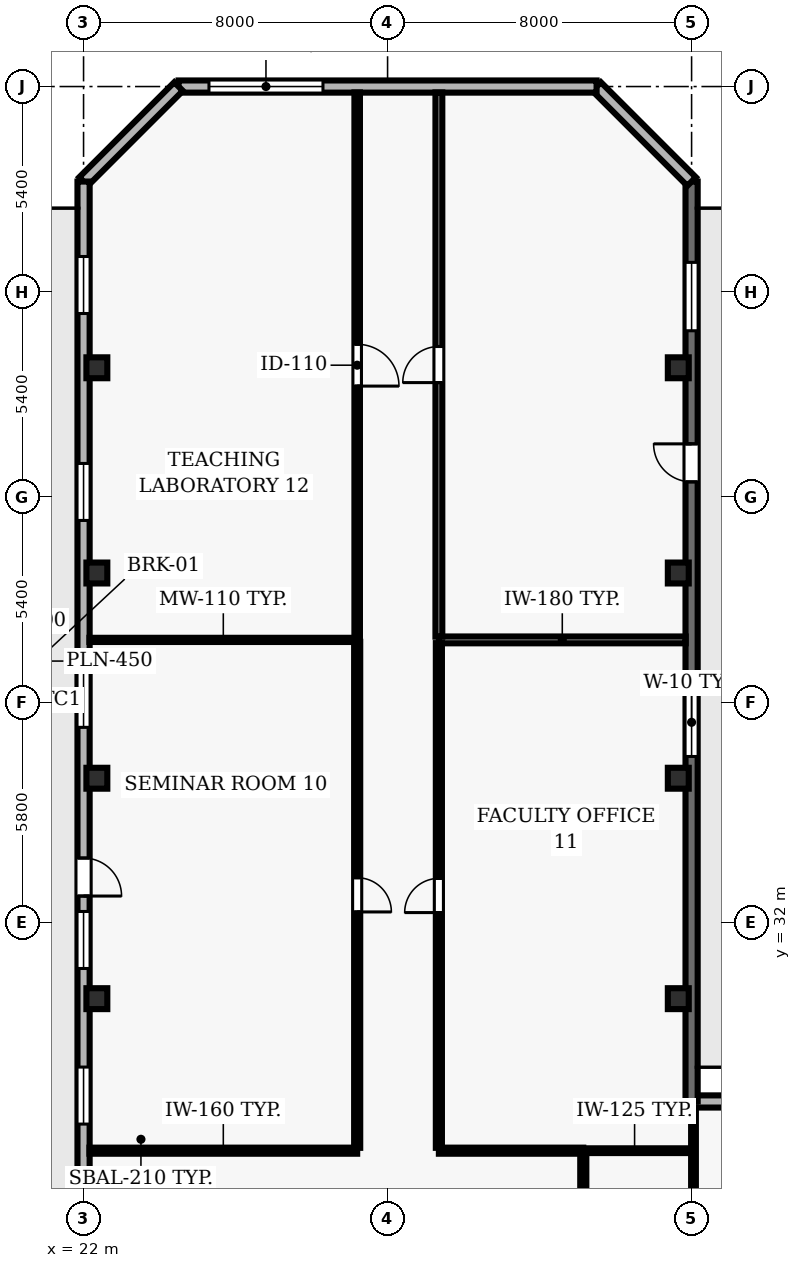
"""IFC4 building model, lengths in metres.
Left out: names, types, materials, properties, quantities, classifications, styles, units other than length and angle.
Written with IfcOpenShell. Run it as: python <this file> out.ifc"""

import sys

from ifc_helpers import new_model, si_unit, direction, frame, frame_2d, origin, origin_2d, place, context, subcontext, project, spatial, rectangle, hollow_rectangle, extrude, element, fill, save


model = new_model("IFC4")
c1 = context("Model", 3, precision=1e-05, world=origin(), true_north=direction((0.0, 1.0)))
c2 = subcontext(c1, "Body", "Model", "MODEL_VIEW")
j1 = project(units=[si_unit("LENGTHUNIT", "METRE"), si_unit("PLANEANGLEUNIT", "RADIAN")], contexts=[c1])
p1 = place(None, origin())
s1 = spatial("IfcSite", under=j1, at=p1, CompositionType="ELEMENT")
p2 = place(p1, origin())
s2 = spatial("IfcBuilding", under=s1, at=p2, CompositionType="ELEMENT")
p3 = place(p2, frame((0.0, 0.0, 58.3)))
s3 = spatial("IfcBuildingStorey", under=s2, at=p3, CompositionType="ELEMENT", Elevation=58.3)
for number, where, z_axis, x_axis in (
    (1, (22.35, 30.0, 0.0), (0.0, 0.0, 1.0), (1.0, 0.0, 0.0)),
    (2, (37.65, 30.0, 0.0), (0.0, 0.0, 1.0), (1.0, 0.0, 0.0)),
    (3, (22.35, 35.8, 0.0), (0.0, 0.0, 1.0), (1.0, 0.0, 0.0)),
    (4, (37.65, 35.8, 0.0), (0.0, 0.0, 1.0), (1.0, 0.0, 0.0)),
    (5, (22.35, 41.2, 0.0), (0.0, 0.0, 1.0), (1.0, 0.0, 0.0)),
    (6, (37.65, 41.2, 0.0), (0.0, 0.0, 1.0), (1.0, 0.0, 0.0)),
    (7, (22.35, 46.6, 0.0), (0.0, 0.0, 1.0), (1.0, 0.0, 0.0)),
    (8, (37.65, 46.6, 0.0), (0.0, 0.0, 1.0), (1.0, 0.0, 0.0)),
):
    element("IfcColumn", number, at=place(p3, frame(where, z_axis=z_axis, x_axis=x_axis)), inside=s3, PredefinedType="COLUMN", context=c2, shape_type="SweptSolid", body=[
        extrude(hollow_rectangle(XDim=0.55, YDim=0.55, WallThickness=0.025, at=origin_2d()), origin(), (0.0, 0.0, 1.0), 3.9),
    ])
p4 = place(p3, frame((51.4, 27.295, 0.0), z_axis=(0.0, 0.0, 1.0), x_axis=(-1.0, 0.0, 0.0)))
e9 = element("IfcWall", 9, at=p4, inside=s3, PredefinedType="SOLIDWALL", context=c2, shape_type="SweptSolid", body=[
    extrude(rectangle(XDim=13.4, YDim=0.32, at=frame_2d((6.7, 0.0))), origin(), (0.0, 0.0, 1.0), 3.69),
])
p5 = place(p4, frame((1.95, 0.0, 0.9)))
e10 = element("IfcOpeningElement", 10, at=p5, cuts=e9, PredefinedType="OPENING", context=c2, shape_type="SweptSolid", body=[
    extrude(rectangle(XDim=2.8, YDim=1.8, at=frame_2d((1.4, 0.9))), frame((0.0, 0.17, 0.0), z_axis=(0.0, -1.0, 0.0), x_axis=(1.0, 0.0, 0.0)), (0.0, 0.0, 1.0), 0.34),
])
p6 = place(p4, frame((8.65, 0.0, 0.9)))
e11 = element("IfcOpeningElement", 11, at=p6, cuts=e9, PredefinedType="OPENING", context=c2, shape_type="SweptSolid", body=[
    extrude(rectangle(XDim=2.8, YDim=1.8, at=frame_2d((1.4, 0.9))), frame((0.0, 0.17, 0.0), z_axis=(0.0, -1.0, 0.0), x_axis=(1.0, 0.0, 0.0)), (0.0, 0.0, 1.0), 0.34),
])
p7 = place(p3, frame((38.0, 27.295, 0.0), z_axis=(0.0, 0.0, 1.0), x_axis=(0.0, 1.0, 0.0)))
e12 = element("IfcWall", 12, at=p7, inside=s3, PredefinedType="SOLIDWALL", context=c2, shape_type="SweptSolid", body=[
    extrude(rectangle(XDim=24.205, YDim=0.32, at=frame_2d((12.103, 0.0))), origin(), (0.0, 0.0, 1.0), 3.69),
])
p8 = place(p7, frame((16.303, 0.0, 0.0)))
e13 = element("IfcOpeningElement", 13, at=p8, cuts=e12, PredefinedType="OPENING", context=c2, shape_type="SweptSolid", body=[
    extrude(rectangle(XDim=1.0, YDim=2.2, at=frame_2d((0.5, 1.1))), frame((0.0, 0.17, 0.0), z_axis=(0.0, -1.0, 0.0), x_axis=(1.0, 0.0, 0.0)), (0.0, 0.0, 1.0), 0.34),
])
p9 = place(p7, frame((9.077, 0.0, 0.9)))
e14 = element("IfcOpeningElement", 14, at=p9, cuts=e12, PredefinedType="OPENING", context=c2, shape_type="SweptSolid", body=[
    extrude(rectangle(XDim=1.8, YDim=2.2, at=frame_2d((0.9, 1.1))), frame((0.0, 0.17, 0.0), z_axis=(0.0, -1.0, 0.0), x_axis=(1.0, 0.0, 0.0)), (0.0, 0.0, 1.0), 0.34),
])
p10 = place(p7, frame((20.279, 0.0, 0.9)))
e15 = element("IfcOpeningElement", 15, at=p10, cuts=e12, PredefinedType="OPENING", context=c2, shape_type="SweptSolid", body=[
    extrude(rectangle(XDim=1.8, YDim=2.2, at=frame_2d((0.9, 1.1))), frame((0.0, 0.17, 0.0), z_axis=(0.0, -1.0, 0.0), x_axis=(1.0, 0.0, 0.0)), (0.0, 0.0, 1.0), 0.34),
])
p11 = place(p3, frame((38.0, 51.5, 0.0), z_axis=(0.0, 0.0, 1.0), x_axis=(-0.707106781187, 0.707106781187, 0.0)))
e16 = element("IfcWall", 16, at=p11, inside=s3, PredefinedType="SOLIDWALL", context=c2, shape_type="SweptSolid", body=[
    extrude(rectangle(XDim=3.536, YDim=0.32, at=frame_2d((1.768, 0.0))), origin(), (0.0, 0.0, 1.0), 3.69),
])
p12 = place(p3, frame((35.5, 54.0, 0.0), z_axis=(0.0, 0.0, 1.0), x_axis=(-1.0, 0.0, 0.0)))
e17 = element("IfcWall", 17, at=p12, inside=s3, PredefinedType="SOLIDWALL", context=c2, shape_type="SweptSolid", body=[
    extrude(rectangle(XDim=11.0, YDim=0.32, at=frame_2d((5.5, 0.0))), origin(), (0.0, 0.0, 1.0), 3.69),
])
p13 = place(p12, frame((7.2, 0.0, 0.9)))
e18 = element("IfcOpeningElement", 18, at=p13, cuts=e17, PredefinedType="OPENING", context=c2, shape_type="SweptSolid", body=[
    extrude(rectangle(XDim=3.0, YDim=2.2, at=frame_2d((1.5, 1.1))), frame((0.0, 0.17, 0.0), z_axis=(0.0, -1.0, 0.0), x_axis=(1.0, 0.0, 0.0)), (0.0, 0.0, 1.0), 0.34),
])
p14 = place(p3, frame((24.5, 54.0, 0.0), z_axis=(0.0, 0.0, 1.0), x_axis=(-0.707106781187, -0.707106781187, 0.0)))
e19 = element("IfcWall", 19, at=p14, inside=s3, PredefinedType="SOLIDWALL", context=c2, shape_type="SweptSolid", body=[
    extrude(rectangle(XDim=3.536, YDim=0.32, at=frame_2d((1.768, 0.0))), origin(), (0.0, 0.0, 1.0), 3.69),
])
p15 = place(p3, frame((22.0, 51.5, 0.0), z_axis=(0.0, 0.0, 1.0), x_axis=(0.0, -1.0, 0.0)))
e20 = element("IfcWall", 20, at=p15, inside=s3, PredefinedType="SOLIDWALL", context=c2, shape_type="SweptSolid", body=[
    extrude(rectangle(XDim=49.0, YDim=0.32, at=frame_2d((24.5, 0.0))), origin(), (0.0, 0.0, 1.0), 3.69),
])
p16 = place(p15, frame((17.8, 0.0, 0.0)))
e21 = element("IfcOpeningElement", 21, at=p16, cuts=e20, PredefinedType="OPENING", context=c2, shape_type="SweptSolid", body=[
    extrude(rectangle(XDim=1.0, YDim=2.2, at=frame_2d((0.5, 1.1))), frame((0.0, 0.17, 0.0), z_axis=(0.0, -1.0, 0.0), x_axis=(1.0, 0.0, 0.0)), (0.0, 0.0, 1.0), 0.34),
])
p17 = place(p15, frame((1.972, 0.0, 0.9)))
e22 = element("IfcOpeningElement", 22, at=p17, cuts=e20, PredefinedType="OPENING", context=c2, shape_type="SweptSolid", body=[
    extrude(rectangle(XDim=1.5, YDim=1.6, at=frame_2d((0.75, 0.8))), frame((0.0, 0.17, 0.0), z_axis=(0.0, -1.0, 0.0), x_axis=(1.0, 0.0, 0.0)), (0.0, 0.0, 1.0), 0.34),
])
p18 = place(p15, frame((7.417, 0.0, 0.9)))
e23 = element("IfcOpeningElement", 23, at=p18, cuts=e20, PredefinedType="OPENING", context=c2, shape_type="SweptSolid", body=[
    extrude(rectangle(XDim=1.5, YDim=1.6, at=frame_2d((0.75, 0.8))), frame((0.0, 0.17, 0.0), z_axis=(0.0, -1.0, 0.0), x_axis=(1.0, 0.0, 0.0)), (0.0, 0.0, 1.0), 0.34),
])
p19 = place(p15, frame((12.861, 0.0, 0.9)))
e24 = element("IfcOpeningElement", 24, at=p19, cuts=e20, PredefinedType="OPENING", context=c2, shape_type="SweptSolid", body=[
    extrude(rectangle(XDim=1.5, YDim=1.6, at=frame_2d((0.75, 0.8))), frame((0.0, 0.17, 0.0), z_axis=(0.0, -1.0, 0.0), x_axis=(1.0, 0.0, 0.0)), (0.0, 0.0, 1.0), 0.34),
])
p20 = place(p15, frame((19.206, 0.0, 0.9)))
e25 = element("IfcOpeningElement", 25, at=p20, cuts=e20, PredefinedType="OPENING", context=c2, shape_type="SweptSolid", body=[
    extrude(rectangle(XDim=1.5, YDim=1.6, at=frame_2d((0.75, 0.8))), frame((0.0, 0.17, 0.0), z_axis=(0.0, -1.0, 0.0), x_axis=(1.0, 0.0, 0.0)), (0.0, 0.0, 1.0), 0.34),
])
p21 = place(p15, frame((23.3, 0.0, 0.9)))
e26 = element("IfcOpeningElement", 26, at=p21, cuts=e20, PredefinedType="OPENING", context=c2, shape_type="SweptSolid", body=[
    extrude(rectangle(XDim=1.5, YDim=1.6, at=frame_2d((0.75, 0.8))), frame((0.0, 0.17, 0.0), z_axis=(0.0, -1.0, 0.0), x_axis=(1.0, 0.0, 0.0)), (0.0, 0.0, 1.0), 0.34),
])
p22 = place(p15, frame((29.194, 0.0, 0.9)))
e27 = element("IfcOpeningElement", 27, at=p22, cuts=e20, PredefinedType="OPENING", context=c2, shape_type="SweptSolid", body=[
    extrude(rectangle(XDim=1.5, YDim=1.6, at=frame_2d((0.75, 0.8))), frame((0.0, 0.17, 0.0), z_axis=(0.0, -1.0, 0.0), x_axis=(1.0, 0.0, 0.0)), (0.0, 0.0, 1.0), 0.34),
])
p23 = place(p15, frame((34.189, 0.0, 0.9)))
e28 = element("IfcOpeningElement", 28, at=p23, cuts=e20, PredefinedType="OPENING", context=c2, shape_type="SweptSolid", body=[
    extrude(rectangle(XDim=1.5, YDim=1.6, at=frame_2d((0.75, 0.8))), frame((0.0, 0.17, 0.0), z_axis=(0.0, -1.0, 0.0), x_axis=(1.0, 0.0, 0.0)), (0.0, 0.0, 1.0), 0.34),
])
p24 = place(p15, frame((40.083, 0.0, 0.9)))
e29 = element("IfcOpeningElement", 29, at=p24, cuts=e20, PredefinedType="OPENING", context=c2, shape_type="SweptSolid", body=[
    extrude(rectangle(XDim=1.5, YDim=1.6, at=frame_2d((0.75, 0.8))), frame((0.0, 0.17, 0.0), z_axis=(0.0, -1.0, 0.0), x_axis=(1.0, 0.0, 0.0)), (0.0, 0.0, 1.0), 0.34),
])
p25 = place(p3, frame((29.2, 26.0, 0.0), z_axis=(0.0, 0.0, 1.0), x_axis=(-1.0, 0.0, 0.0)))
e30 = element("IfcWall", 30, at=p25, inside=s3, PredefinedType="PARTITIONING", context=c2, shape_type="SweptSolid", body=[
    extrude(rectangle(XDim=7.045, YDim=0.16, at=frame_2d((3.522, 0.0))), origin(), (0.0, 0.0, 1.0), 3.69),
])
p26 = place(p3, frame((29.2, 39.44, 0.0), z_axis=(0.0, 0.0, 1.0), x_axis=(-1.0, 0.0, 0.0)))
e31 = element("IfcWall", 31, at=p26, inside=s3, PredefinedType="MOVABLE", context=c2, shape_type="SweptSolid", body=[
    extrude(rectangle(XDim=7.045, YDim=0.11, at=frame_2d((3.522, 0.0))), origin(), (0.0, 0.0, 1.0), 3.69),
])
p27 = place(p3, frame((35.15, 26.0, 0.0), z_axis=(0.0, 0.0, 1.0), x_axis=(-1.0, 0.0, 0.0)))
e32 = element("IfcWall", 32, at=p27, inside=s3, PredefinedType="PARTITIONING", context=c2, shape_type="SweptSolid", body=[
    extrude(rectangle(XDim=3.8, YDim=0.16, at=frame_2d((1.9, 0.0))), origin(), (0.0, 0.0, 1.0), 3.69),
])
p28 = place(p3, frame((35.15, 26.0, 0.0), z_axis=(0.0, 0.0, 1.0), x_axis=(1.0, 0.0, 0.0)))
e33 = element("IfcWall", 33, at=p28, inside=s3, PredefinedType="PARTITIONING", context=c2, shape_type="SweptSolid", body=[
    extrude(rectangle(XDim=2.7, YDim=0.125, at=frame_2d((1.35, 0.0))), origin(), (0.0, 0.0, 1.0), 3.69),
])
p29 = place(p3, frame((37.845, 39.44, 0.0), z_axis=(0.0, 0.0, 1.0), x_axis=(-1.0, 0.0, 0.0)))
e34 = element("IfcWall", 34, at=p29, inside=s3, PredefinedType="PARTITIONING", context=c2, shape_type="SweptSolid", body=[
    extrude(rectangle(XDim=6.495, YDim=0.18, at=frame_2d((3.248, 0.0))), origin(), (0.0, 0.0, 1.0), 3.69),
])
p30 = place(p3, frame((29.2, 39.39, 0.0), z_axis=(0.0, 0.0, 1.0), x_axis=(0.0, -1.0, 0.0)))
e35 = element("IfcWall", 35, at=p30, inside=s3, PredefinedType="PARTITIONING", context=c2, shape_type="SweptSolid", body=[
    extrude(rectangle(XDim=13.315, YDim=0.16, at=frame_2d((6.657, 0.0))), origin(), (0.0, 0.0, 1.0), 3.69),
])
p31 = place(p30, frame((6.208, 0.0, 0.0)))
e36 = element("IfcOpeningElement", 36, at=p31, cuts=e35, PredefinedType="OPENING", context=c2, shape_type="SweptSolid", body=[
    extrude(rectangle(XDim=0.9, YDim=2.1, at=frame_2d((0.45, 1.05))), frame((0.0, 0.09, 0.0), z_axis=(0.0, -1.0, 0.0), x_axis=(1.0, 0.0, 0.0)), (0.0, 0.0, 1.0), 0.18),
])
p32 = place(p3, frame((29.2, 53.845, 0.0), z_axis=(0.0, 0.0, 1.0), x_axis=(0.0, -1.0, 0.0)))
e37 = element("IfcWall", 37, at=p32, inside=s3, PredefinedType="PARTITIONING", context=c2, shape_type="SweptSolid", body=[
    extrude(rectangle(XDim=14.355, YDim=0.145, at=frame_2d((7.177, 0.0))), origin(), (0.0, 0.0, 1.0), 3.69),
])
p33 = place(p32, frame((6.627, 0.0, 0.0)))
e38 = element("IfcOpeningElement", 38, at=p33, cuts=e37, PredefinedType="OPENING", context=c2, shape_type="SweptSolid", body=[
    extrude(rectangle(XDim=1.1, YDim=2.15, at=frame_2d((0.55, 1.075))), frame((0.0, 0.083, 0.0), z_axis=(0.0, -1.0, 0.0), x_axis=(1.0, 0.0, 0.0)), (0.0, 0.0, 1.0), 0.165),
])
p34 = place(p3, frame((31.35, 26.075, 0.0), z_axis=(0.0, 0.0, 1.0), x_axis=(0.0, 1.0, 0.0)))
e39 = element("IfcWall", 39, at=p34, inside=s3, PredefinedType="PARTITIONING", context=c2, shape_type="SweptSolid", body=[
    extrude(rectangle(XDim=13.28, YDim=0.16, at=frame_2d((6.64, 0.0))), origin(), (0.0, 0.0, 1.0), 3.69),
])
p35 = place(p34, frame((6.19, 0.0, 0.0)))
e40 = element("IfcOpeningElement", 40, at=p35, cuts=e39, PredefinedType="OPENING", context=c2, shape_type="SweptSolid", body=[
    extrude(rectangle(XDim=0.9, YDim=2.1, at=frame_2d((0.45, 1.05))), frame((0.0, 0.09, 0.0), z_axis=(0.0, -1.0, 0.0), x_axis=(1.0, 0.0, 0.0)), (0.0, 0.0, 1.0), 0.18),
])
p36 = place(p3, frame((31.35, 39.525, 0.0), z_axis=(0.0, 0.0, 1.0), x_axis=(0.0, 1.0, 0.0)))
e41 = element("IfcWall", 41, at=p36, inside=s3, PredefinedType="PARTITIONING", context=c2, shape_type="SweptSolid", body=[
    extrude(rectangle(XDim=14.32, YDim=0.18, at=frame_2d((7.16, 0.0))), origin(), (0.0, 0.0, 1.0), 3.69),
])
p37 = place(p36, frame((6.685, 0.0, 0.0)))
e42 = element("IfcOpeningElement", 42, at=p37, cuts=e41, PredefinedType="OPENING", context=c2, shape_type="SweptSolid", body=[
    extrude(rectangle(XDim=0.95, YDim=2.1, at=frame_2d((0.475, 1.05))), frame((0.0, 0.1, 0.0), z_axis=(0.0, -1.0, 0.0), x_axis=(1.0, 0.0, 0.0)), (0.0, 0.0, 1.0), 0.2),
])
p38 = place(p3, frame((35.15, 24.07, 0.0), z_axis=(0.0, 0.0, 1.0), x_axis=(0.0, 1.0, 0.0)))
e43 = element("IfcWall", 43, at=p38, inside=s3, PredefinedType="PARTITIONING", context=c2, shape_type="SweptSolid", body=[
    extrude(rectangle(XDim=1.855, YDim=0.16, at=frame_2d((0.927, 0.0))), origin(), (0.0, 0.0, 1.0), 3.69),
])
p39 = place(p3, frame((38.05, 27.14, 0.0), z_axis=(0.0, 0.0, 1.0), x_axis=(0.0, -1.0, 0.0)))
e44 = element("IfcWall", 44, at=p39, inside=s3, PredefinedType="PARTITIONING", context=c2, shape_type="SweptSolid", body=[
    extrude(rectangle(XDim=3.09, YDim=0.125, at=frame_2d((1.545, 0.0))), origin(), (0.0, 0.0, 1.0), 3.055),
])
p40 = place(p8, origin())
e45 = element("IfcDoor", 45, at=p40, inside=s3, OperationType="SINGLE_SWING_RIGHT", PredefinedType="DOOR", context=c2, shape_type="SweptSolid", body=[
    extrude(rectangle(XDim=1.0, YDim=2.2, at=frame_2d((0.5, 1.1))), frame((0.0, 0.025, 0.0), z_axis=(0.0, -1.0, 0.0), x_axis=(1.0, 0.0, 0.0)), (0.0, 0.0, 1.0), 0.05),
])
fill(e13, e45)
p41 = place(p9, origin())
e46 = element("IfcWindow", 46, at=p41, inside=s3, PartitioningType="SINGLE_PANEL", PredefinedType="WINDOW", context=c2, shape_type="SweptSolid", body=[
    extrude(rectangle(XDim=1.8, YDim=2.2, at=frame_2d((0.9, 1.1))), frame((0.0, 0.03, 0.0), z_axis=(0.0, -1.0, 0.0), x_axis=(1.0, 0.0, 0.0)), (0.0, 0.0, 1.0), 0.06),
])
fill(e14, e46)
p42 = place(p10, origin())
e47 = element("IfcWindow", 47, at=p42, inside=s3, PartitioningType="SINGLE_PANEL", PredefinedType="WINDOW", context=c2, shape_type="SweptSolid", body=[
    extrude(rectangle(XDim=1.8, YDim=2.2, at=frame_2d((0.9, 1.1))), frame((0.0, 0.03, 0.0), z_axis=(0.0, -1.0, 0.0), x_axis=(1.0, 0.0, 0.0)), (0.0, 0.0, 1.0), 0.06),
])
fill(e15, e47)
p43 = place(p13, origin())
e48 = element("IfcWindow", 48, at=p43, inside=s3, PartitioningType="SINGLE_PANEL", PredefinedType="WINDOW", context=c2, shape_type="SweptSolid", body=[
    extrude(rectangle(XDim=3.0, YDim=2.2, at=frame_2d((1.5, 1.1))), frame((0.0, 0.03, 0.0), z_axis=(0.0, -1.0, 0.0), x_axis=(1.0, 0.0, 0.0)), (0.0, 0.0, 1.0), 0.06),
])
fill(e18, e48)
p44 = place(p16, origin())
e49 = element("IfcDoor", 49, at=p44, inside=s3, OperationType="SINGLE_SWING_RIGHT", PredefinedType="DOOR", context=c2, shape_type="SweptSolid", body=[
    extrude(rectangle(XDim=1.0, YDim=2.2, at=frame_2d((0.5, 1.1))), frame((0.0, 0.025, 0.0), z_axis=(0.0, -1.0, 0.0), x_axis=(1.0, 0.0, 0.0)), (0.0, 0.0, 1.0), 0.05),
])
fill(e21, e49)
p45 = place(p17, origin())
e50 = element("IfcWindow", 50, at=p45, inside=s3, PartitioningType="SINGLE_PANEL", PredefinedType="WINDOW", context=c2, shape_type="SweptSolid", body=[
    extrude(rectangle(XDim=1.5, YDim=1.6, at=frame_2d((0.75, 0.8))), frame((0.0, 0.03, 0.0), z_axis=(0.0, -1.0, 0.0), x_axis=(1.0, 0.0, 0.0)), (0.0, 0.0, 1.0), 0.06),
])
fill(e22, e50)
p46 = place(p18, origin())
e51 = element("IfcWindow", 51, at=p46, inside=s3, PartitioningType="SINGLE_PANEL", PredefinedType="WINDOW", context=c2, shape_type="SweptSolid", body=[
    extrude(rectangle(XDim=1.5, YDim=1.6, at=frame_2d((0.75, 0.8))), frame((0.0, 0.03, 0.0), z_axis=(0.0, -1.0, 0.0), x_axis=(1.0, 0.0, 0.0)), (0.0, 0.0, 1.0), 0.06),
])
fill(e23, e51)
p47 = place(p19, origin())
e52 = element("IfcWindow", 52, at=p47, inside=s3, PartitioningType="SINGLE_PANEL", PredefinedType="WINDOW", context=c2, shape_type="SweptSolid", body=[
    extrude(rectangle(XDim=1.5, YDim=1.6, at=frame_2d((0.75, 0.8))), frame((0.0, 0.03, 0.0), z_axis=(0.0, -1.0, 0.0), x_axis=(1.0, 0.0, 0.0)), (0.0, 0.0, 1.0), 0.06),
])
fill(e24, e52)
p48 = place(p20, origin())
e53 = element("IfcWindow", 53, at=p48, inside=s3, PartitioningType="SINGLE_PANEL", PredefinedType="WINDOW", context=c2, shape_type="SweptSolid", body=[
    extrude(rectangle(XDim=1.5, YDim=1.6, at=frame_2d((0.75, 0.8))), frame((0.0, 0.03, 0.0), z_axis=(0.0, -1.0, 0.0), x_axis=(1.0, 0.0, 0.0)), (0.0, 0.0, 1.0), 0.06),
])
fill(e25, e53)
p49 = place(p21, origin())
e54 = element("IfcWindow", 54, at=p49, inside=s3, PartitioningType="SINGLE_PANEL", PredefinedType="WINDOW", context=c2, shape_type="SweptSolid", body=[
    extrude(rectangle(XDim=1.5, YDim=1.6, at=frame_2d((0.75, 0.8))), frame((0.0, 0.03, 0.0), z_axis=(0.0, -1.0, 0.0), x_axis=(1.0, 0.0, 0.0)), (0.0, 0.0, 1.0), 0.06),
])
fill(e26, e54)
p50 = place(p31, origin())
e55 = element("IfcDoor", 55, at=p50, inside=s3, OperationType="SINGLE_SWING_RIGHT", PredefinedType="DOOR", context=c2, shape_type="SweptSolid", body=[
    extrude(rectangle(XDim=0.9, YDim=2.1, at=frame_2d((0.45, 1.05))), frame((0.0, 0.025, 0.0), z_axis=(0.0, -1.0, 0.0), x_axis=(1.0, 0.0, 0.0)), (0.0, 0.0, 1.0), 0.05),
])
fill(e36, e55)
p51 = place(p35, origin())
e56 = element("IfcDoor", 56, at=p51, inside=s3, OperationType="SINGLE_SWING_LEFT", PredefinedType="DOOR", context=c2, shape_type="SweptSolid", body=[
    extrude(rectangle(XDim=0.9, YDim=2.1, at=frame_2d((0.45, 1.05))), frame((0.0, 0.025, 0.0), z_axis=(0.0, -1.0, 0.0), x_axis=(1.0, 0.0, 0.0)), (0.0, 0.0, 1.0), 0.05),
])
fill(e40, e56)
p52 = place(p33, origin())
e57 = element("IfcDoor", 57, at=p52, inside=s3, OperationType="SINGLE_SWING_RIGHT", PredefinedType="DOOR", context=c2, shape_type="SweptSolid", body=[
    extrude(rectangle(XDim=1.1, YDim=2.15, at=frame_2d((0.55, 1.075))), frame((0.0, 0.025, 0.0), z_axis=(0.0, -1.0, 0.0), x_axis=(1.0, 0.0, 0.0)), (0.0, 0.0, 1.0), 0.05),
])
fill(e38, e57)
p53 = place(p37, origin())
e58 = element("IfcDoor", 58, at=p53, inside=s3, OperationType="SINGLE_SWING_LEFT", PredefinedType="DOOR", context=c2, shape_type="SweptSolid", body=[
    extrude(rectangle(XDim=0.95, YDim=2.1, at=frame_2d((0.475, 1.05))), frame((0.0, 0.025, 0.0), z_axis=(0.0, -1.0, 0.0), x_axis=(1.0, 0.0, 0.0)), (0.0, 0.0, 1.0), 0.05),
])
fill(e42, e58)
save(model, sys.argv[1])
